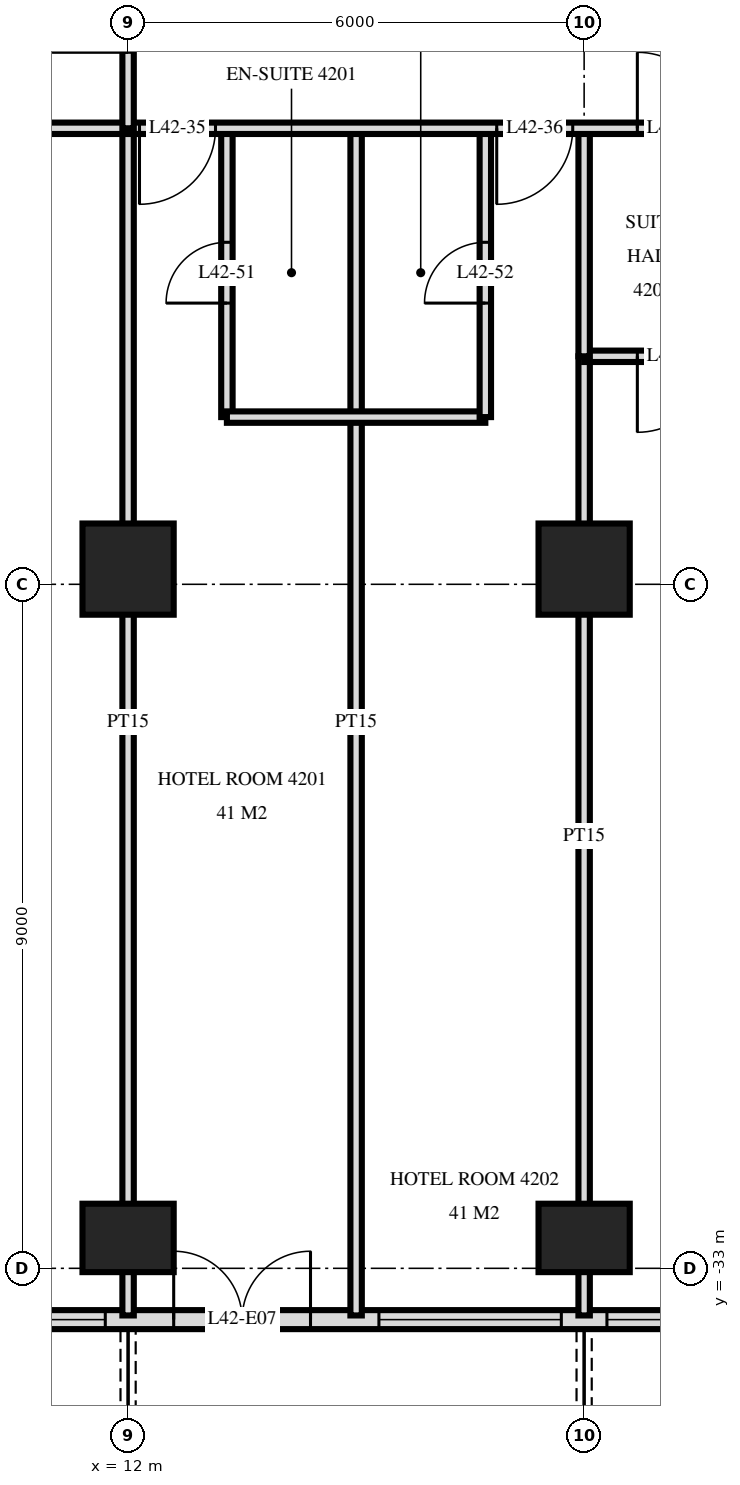
"""IFC4 building model, lengths in metres.
Left out: names, types, materials, properties, quantities, classifications, styles, units other than length and angle.
Written with IfcOpenShell. Run it as: python <this file> out.ifc"""

import sys

from ifc_helpers import new_model, si_unit, direction, frame, frame_2d, origin, origin_2d, place, context, subcontext, project, spatial, rectangle, extrude, element, fill, save


model = new_model("IFC4")
c1 = context("Model", 3, precision=1e-05, world=origin(), true_north=direction((0.0, 1.0)))
c2 = subcontext(c1, "Body", "Model", "MODEL_VIEW")
j1 = project(units=[si_unit("LENGTHUNIT", "METRE"), si_unit("PLANEANGLEUNIT", "RADIAN")], contexts=[c1])
p1 = place(None, origin())
s1 = spatial("IfcSite", under=j1, at=p1, CompositionType="ELEMENT")
p2 = place(p1, origin())
s2 = spatial("IfcBuilding", under=s1, at=p2, CompositionType="ELEMENT")
p3 = place(p2, frame((0.0, 0.0, 163.2)))
s3 = spatial("IfcBuildingStorey", under=s2, at=p3, CompositionType="ELEMENT", Elevation=163.2)
p4 = place(p3, frame((12.0, -32.6, 0.0), z_axis=(0.0, 0.0, 1.0), x_axis=(1.0, 0.0, 0.0)))
e1 = element("IfcColumn", 1, at=p4, inside=s3, PredefinedType="COLUMN", context=c2, shape_type="SweptSolid", body=[
    extrude(rectangle(XDim=1.2, YDim=0.9, at=origin_2d()), origin(), (0.0, 0.0, 1.0), 3.6),
])
p5 = place(p3, frame((12.0, -23.8, 0.0), z_axis=(0.0, 0.0, 1.0), x_axis=(1.0, 0.0, 0.0)))
e2 = element("IfcColumn", 2, at=p5, inside=s3, PredefinedType="COLUMN", context=c2, shape_type="SweptSolid", body=[
    extrude(rectangle(XDim=1.2, YDim=1.2, at=origin_2d()), origin(), (0.0, 0.0, 1.0), 3.6),
])
p6 = place(p3, frame((18.0, -32.6, 0.0), z_axis=(0.0, 0.0, 1.0), x_axis=(1.0, 0.0, 0.0)))
e3 = element("IfcColumn", 3, at=p6, inside=s3, PredefinedType="COLUMN", context=c2, shape_type="SweptSolid", body=[
    extrude(rectangle(XDim=1.2, YDim=0.9, at=origin_2d()), origin(), (0.0, 0.0, 1.0), 3.6),
])
p7 = place(p3, frame((18.0, -23.8, 0.0), z_axis=(0.0, 0.0, 1.0), x_axis=(1.0, 0.0, 0.0)))
e4 = element("IfcColumn", 4, at=p7, inside=s3, PredefinedType="COLUMN", context=c2, shape_type="SweptSolid", body=[
    extrude(rectangle(XDim=1.2, YDim=1.2, at=origin_2d()), origin(), (0.0, 0.0, 1.0), 3.6),
])
p8 = place(p3, frame((-23.675, -33.675, 0.0), z_axis=(0.0, 0.0, 1.0), x_axis=(1.0, 0.0, 0.0)))
e5 = element("IfcWall", 5, at=p8, inside=s3, PredefinedType="SOLIDWALL", context=c2, shape_type="SweptSolid", body=[
    extrude(rectangle(XDim=47.351, YDim=0.25, at=frame_2d((23.675, 0.0))), origin(), (0.0, 0.0, 1.0), 3.32),
])
p9 = place(p8, frame((0.575, 0.0, 0.0)))
e6 = element("IfcOpeningElement", 6, at=p9, cuts=e5, PredefinedType="OPENING", context=c2, shape_type="SweptSolid", body=[
    extrude(rectangle(XDim=1.8, YDim=2.4, at=frame_2d((0.9, 1.2))), frame((0.0, 0.135, 0.0), z_axis=(0.0, -1.0, 0.0), x_axis=(1.0, 0.0, 0.0)), (0.0, 0.0, 1.0), 0.27),
])
p10 = place(p8, frame((3.425, 0.0, 0.3)))
e7 = element("IfcOpeningElement", 7, at=p10, cuts=e5, PredefinedType="OPENING", context=c2, shape_type="SweptSolid", body=[
    extrude(rectangle(XDim=1.8, YDim=2.1, at=frame_2d((0.9, 1.05))), frame((0.0, 0.135, 0.0), z_axis=(0.0, -1.0, 0.0), x_axis=(1.0, 0.0, 0.0)), (0.0, 0.0, 1.0), 0.27),
])
p11 = place(p8, frame((5.975, 0.0, 0.3)))
e8 = element("IfcOpeningElement", 8, at=p11, cuts=e5, PredefinedType="OPENING", context=c2, shape_type="SweptSolid", body=[
    extrude(rectangle(XDim=2.4, YDim=2.1, at=frame_2d((1.2, 1.05))), frame((0.0, 0.135, 0.0), z_axis=(0.0, -1.0, 0.0), x_axis=(1.0, 0.0, 0.0)), (0.0, 0.0, 1.0), 0.27),
])
p12 = place(p8, frame((9.275, 0.0, 0.0)))
e9 = element("IfcOpeningElement", 9, at=p12, cuts=e5, PredefinedType="OPENING", context=c2, shape_type="SweptSolid", body=[
    extrude(rectangle(XDim=1.8, YDim=2.4, at=frame_2d((0.9, 1.2))), frame((0.0, 0.135, 0.0), z_axis=(0.0, -1.0, 0.0), x_axis=(1.0, 0.0, 0.0)), (0.0, 0.0, 1.0), 0.27),
])
p13 = place(p8, frame((12.275, 0.0, 0.0)))
e10 = element("IfcOpeningElement", 10, at=p13, cuts=e5, PredefinedType="OPENING", context=c2, shape_type="SweptSolid", body=[
    extrude(rectangle(XDim=1.8, YDim=2.4, at=frame_2d((0.9, 1.2))), frame((0.0, 0.135, 0.0), z_axis=(0.0, -1.0, 0.0), x_axis=(1.0, 0.0, 0.0)), (0.0, 0.0, 1.0), 0.27),
])
p14 = place(p8, frame((14.975, 0.0, 0.3)))
e11 = element("IfcOpeningElement", 11, at=p14, cuts=e5, PredefinedType="OPENING", context=c2, shape_type="SweptSolid", body=[
    extrude(rectangle(XDim=2.4, YDim=2.1, at=frame_2d((1.2, 1.05))), frame((0.0, 0.135, 0.0), z_axis=(0.0, -1.0, 0.0), x_axis=(1.0, 0.0, 0.0)), (0.0, 0.0, 1.0), 0.27),
])
p15 = place(p8, frame((17.975, 0.0, 0.3)))
e12 = element("IfcOpeningElement", 12, at=p15, cuts=e5, PredefinedType="OPENING", context=c2, shape_type="SweptSolid", body=[
    extrude(rectangle(XDim=2.4, YDim=2.1, at=frame_2d((1.2, 1.05))), frame((0.0, 0.135, 0.0), z_axis=(0.0, -1.0, 0.0), x_axis=(1.0, 0.0, 0.0)), (0.0, 0.0, 1.0), 0.27),
])
p16 = place(p8, frame((21.275, 0.0, 0.0)))
e13 = element("IfcOpeningElement", 13, at=p16, cuts=e5, PredefinedType="OPENING", context=c2, shape_type="SweptSolid", body=[
    extrude(rectangle(XDim=1.8, YDim=2.4, at=frame_2d((0.9, 1.2))), frame((0.0, 0.135, 0.0), z_axis=(0.0, -1.0, 0.0), x_axis=(1.0, 0.0, 0.0)), (0.0, 0.0, 1.0), 0.27),
])
p17 = place(p8, frame((24.275, 0.0, 0.0)))
e14 = element("IfcOpeningElement", 14, at=p17, cuts=e5, PredefinedType="OPENING", context=c2, shape_type="SweptSolid", body=[
    extrude(rectangle(XDim=1.8, YDim=2.4, at=frame_2d((0.9, 1.2))), frame((0.0, 0.135, 0.0), z_axis=(0.0, -1.0, 0.0), x_axis=(1.0, 0.0, 0.0)), (0.0, 0.0, 1.0), 0.27),
])
p18 = place(p8, frame((26.975, 0.0, 0.3)))
e15 = element("IfcOpeningElement", 15, at=p18, cuts=e5, PredefinedType="OPENING", context=c2, shape_type="SweptSolid", body=[
    extrude(rectangle(XDim=2.4, YDim=2.1, at=frame_2d((1.2, 1.05))), frame((0.0, 0.135, 0.0), z_axis=(0.0, -1.0, 0.0), x_axis=(1.0, 0.0, 0.0)), (0.0, 0.0, 1.0), 0.27),
])
p19 = place(p8, frame((30.275, 0.0, 0.0)))
e16 = element("IfcOpeningElement", 16, at=p19, cuts=e5, PredefinedType="OPENING", context=c2, shape_type="SweptSolid", body=[
    extrude(rectangle(XDim=1.8, YDim=2.4, at=frame_2d((0.9, 1.2))), frame((0.0, 0.135, 0.0), z_axis=(0.0, -1.0, 0.0), x_axis=(1.0, 0.0, 0.0)), (0.0, 0.0, 1.0), 0.27),
])
p20 = place(p8, frame((32.975, 0.0, 0.3)))
e17 = element("IfcOpeningElement", 17, at=p20, cuts=e5, PredefinedType="OPENING", context=c2, shape_type="SweptSolid", body=[
    extrude(rectangle(XDim=2.4, YDim=2.1, at=frame_2d((1.2, 1.05))), frame((0.0, 0.135, 0.0), z_axis=(0.0, -1.0, 0.0), x_axis=(1.0, 0.0, 0.0)), (0.0, 0.0, 1.0), 0.27),
])
p21 = place(p8, frame((36.275, 0.0, 0.0)))
e18 = element("IfcOpeningElement", 18, at=p21, cuts=e5, PredefinedType="OPENING", context=c2, shape_type="SweptSolid", body=[
    extrude(rectangle(XDim=1.8, YDim=2.4, at=frame_2d((0.9, 1.2))), frame((0.0, 0.135, 0.0), z_axis=(0.0, -1.0, 0.0), x_axis=(1.0, 0.0, 0.0)), (0.0, 0.0, 1.0), 0.27),
])
p22 = place(p8, frame((38.975, 0.0, 0.3)))
e19 = element("IfcOpeningElement", 19, at=p22, cuts=e5, PredefinedType="OPENING", context=c2, shape_type="SweptSolid", body=[
    extrude(rectangle(XDim=2.4, YDim=2.1, at=frame_2d((1.2, 1.05))), frame((0.0, 0.135, 0.0), z_axis=(0.0, -1.0, 0.0), x_axis=(1.0, 0.0, 0.0)), (0.0, 0.0, 1.0), 0.27),
])
p23 = place(p8, frame((41.975, 0.0, 0.3)))
e20 = element("IfcOpeningElement", 20, at=p23, cuts=e5, PredefinedType="OPENING", context=c2, shape_type="SweptSolid", body=[
    extrude(rectangle(XDim=2.4, YDim=2.1, at=frame_2d((1.2, 1.05))), frame((0.0, 0.135, 0.0), z_axis=(0.0, -1.0, 0.0), x_axis=(1.0, 0.0, 0.0)), (0.0, 0.0, 1.0), 0.27),
])
p24 = place(p8, frame((45.125, 0.0, 0.0)))
e21 = element("IfcOpeningElement", 21, at=p24, cuts=e5, PredefinedType="OPENING", context=c2, shape_type="SweptSolid", body=[
    extrude(rectangle(XDim=1.8, YDim=2.4, at=frame_2d((0.9, 1.2))), frame((0.0, 0.135, 0.0), z_axis=(0.0, -1.0, 0.0), x_axis=(1.0, 0.0, 0.0)), (0.0, 0.0, 1.0), 0.27),
])
p25 = place(p3, frame((18.0, -21.0, 0.0), z_axis=(0.0, 0.0, 1.0), x_axis=(0.0, 1.0, 0.0)))
e22 = element("IfcWall", 22, at=p25, inside=s3, PredefinedType="PARTITIONING", context=c2, shape_type="SweptSolid", body=[
    extrude(rectangle(XDim=3.0, YDim=0.15, at=frame_2d((1.5, 0.0))), origin(), (0.0, 0.0, 1.0), 3.32),
])
p26 = place(p3, frame((18.0, -33.62, 0.0), z_axis=(0.0, 0.0, 1.0), x_axis=(0.0, 1.0, 0.0)))
e23 = element("IfcWall", 23, at=p26, inside=s3, PredefinedType="PARTITIONING", context=c2, shape_type="SweptSolid", body=[
    extrude(rectangle(XDim=12.62, YDim=0.15, at=frame_2d((6.31, 0.0))), origin(), (0.0, 0.0, 1.0), 3.32),
])
p27 = place(p3, frame((16.7, -21.8, 0.0), z_axis=(0.0, 0.0, 1.0), x_axis=(0.0, 1.0, 0.0)))
e24 = element("IfcWall", 24, at=p27, inside=s3, PredefinedType="PARTITIONING", context=c2, shape_type="SweptSolid", body=[
    extrude(rectangle(XDim=3.8, YDim=0.15, at=frame_2d((1.9, 0.0))), origin(), (0.0, 0.0, 1.0), 3.32),
])
p28 = place(p27, frame((1.5, 0.0, 0.0)))
e25 = element("IfcOpeningElement", 25, at=p28, cuts=e24, PredefinedType="OPENING", context=c2, shape_type="SweptSolid", body=[
    extrude(rectangle(XDim=0.8, YDim=2.1, at=frame_2d((0.4, 1.05))), frame((0.0, 0.085, 0.0), z_axis=(0.0, -1.0, 0.0), x_axis=(1.0, 0.0, 0.0)), (0.0, 0.0, 1.0), 0.17),
])
p29 = place(p3, frame((15.0, -33.62, 0.0), z_axis=(0.0, 0.0, 1.0), x_axis=(0.0, 1.0, 0.0)))
e26 = element("IfcWall", 26, at=p29, inside=s3, PredefinedType="PARTITIONING", context=c2, shape_type="SweptSolid", body=[
    extrude(rectangle(XDim=15.62, YDim=0.15, at=frame_2d((7.81, 0.0))), origin(), (0.0, 0.0, 1.0), 3.32),
])
p30 = place(p3, frame((13.3, -21.8, 0.0), z_axis=(0.0, 0.0, 1.0), x_axis=(0.0, 1.0, 0.0)))
e27 = element("IfcWall", 27, at=p30, inside=s3, PredefinedType="PARTITIONING", context=c2, shape_type="SweptSolid", body=[
    extrude(rectangle(XDim=3.8, YDim=0.15, at=frame_2d((1.9, 0.0))), origin(), (0.0, 0.0, 1.0), 3.32),
])
p31 = place(p30, frame((1.5, 0.0, 0.0)))
e28 = element("IfcOpeningElement", 28, at=p31, cuts=e27, PredefinedType="OPENING", context=c2, shape_type="SweptSolid", body=[
    extrude(rectangle(XDim=0.8, YDim=2.1, at=frame_2d((0.4, 1.05))), frame((0.0, 0.085, 0.0), z_axis=(0.0, -1.0, 0.0), x_axis=(1.0, 0.0, 0.0)), (0.0, 0.0, 1.0), 0.17),
])
p32 = place(p3, frame((12.0, -18.0, 0.0), z_axis=(0.0, 0.0, 1.0), x_axis=(0.0, 1.0, 0.0)))
e29 = element("IfcWall", 29, at=p32, inside=s3, PredefinedType="PARTITIONING", context=c2, shape_type="SweptSolid", body=[
    extrude(rectangle(XDim=2.95, YDim=0.15, at=frame_2d((1.475, 0.0))), origin(), (0.0, 0.0, 1.0), 3.32),
])
p33 = place(p32, frame((1.0, 0.0, 0.0)))
e30 = element("IfcOpeningElement", 30, at=p33, cuts=e29, PredefinedType="OPENING", context=c2, shape_type="SweptSolid", body=[
    extrude(rectangle(XDim=1.0, YDim=2.1, at=frame_2d((0.5, 1.05))), frame((0.0, 0.085, 0.0), z_axis=(0.0, -1.0, 0.0), x_axis=(1.0, 0.0, 0.0)), (0.0, 0.0, 1.0), 0.17),
])
p34 = place(p3, frame((12.0, -33.62, 0.0), z_axis=(0.0, 0.0, 1.0), x_axis=(0.0, 1.0, 0.0)))
e31 = element("IfcWall", 31, at=p34, inside=s3, PredefinedType="PARTITIONING", context=c2, shape_type="SweptSolid", body=[
    extrude(rectangle(XDim=15.62, YDim=0.15, at=frame_2d((7.81, 0.0))), origin(), (0.0, 0.0, 1.0), 3.32),
])
p35 = place(p3, frame((13.3, -21.8, 0.0), z_axis=(0.0, 0.0, 1.0), x_axis=(1.0, 0.0, 0.0)))
e32 = element("IfcWall", 32, at=p35, inside=s3, PredefinedType="PARTITIONING", context=c2, shape_type="SweptSolid", body=[
    extrude(rectangle(XDim=3.4, YDim=0.15, at=frame_2d((1.7, 0.0))), origin(), (0.0, 0.0, 1.0), 3.32),
])
p36 = place(p3, frame((18.0, -21.0, 0.0), z_axis=(0.0, 0.0, 1.0), x_axis=(1.0, 0.0, 0.0)))
e33 = element("IfcWall", 33, at=p36, inside=s3, PredefinedType="PARTITIONING", context=c2, shape_type="SweptSolid", body=[
    extrude(rectangle(XDim=2.4, YDim=0.15, at=frame_2d((1.2, 0.0))), origin(), (0.0, 0.0, 1.0), 3.32),
])
p37 = place(p36, frame((0.7, 0.0, 0.0)))
e34 = element("IfcOpeningElement", 34, at=p37, cuts=e33, PredefinedType="OPENING", context=c2, shape_type="SweptSolid", body=[
    extrude(rectangle(XDim=1.0, YDim=2.1, at=frame_2d((0.5, 1.05))), frame((0.0, 0.085, 0.0), z_axis=(0.0, -1.0, 0.0), x_axis=(1.0, 0.0, 0.0)), (0.0, 0.0, 1.0), 0.17),
])
p38 = place(p3, frame((-28.02, -18.0, 0.0), z_axis=(0.0, 0.0, 1.0), x_axis=(1.0, 0.0, 0.0)))
e35 = element("IfcWall", 35, at=p38, inside=s3, PredefinedType="PARTITIONING", context=c2, shape_type="SweptSolid", body=[
    extrude(rectangle(XDim=56.04, YDim=0.15, at=frame_2d((28.02, 0.0))), origin(), (0.0, 0.0, 1.0), 3.32),
])
p39 = place(p38, frame((14.32, 0.0, 0.0)))
e36 = element("IfcOpeningElement", 36, at=p39, cuts=e35, PredefinedType="OPENING", context=c2, shape_type="SweptSolid", body=[
    extrude(rectangle(XDim=1.0, YDim=2.1, at=frame_2d((0.5, 1.05))), frame((0.0, 0.085, 0.0), z_axis=(0.0, -1.0, 0.0), x_axis=(1.0, 0.0, 0.0)), (0.0, 0.0, 1.0), 0.17),
])
p40 = place(p38, frame((40.17, 0.0, 0.0)))
e37 = element("IfcOpeningElement", 37, at=p40, cuts=e35, PredefinedType="OPENING", context=c2, shape_type="SweptSolid", body=[
    extrude(rectangle(XDim=1.0, YDim=2.1, at=frame_2d((0.5, 1.05))), frame((0.0, 0.085, 0.0), z_axis=(0.0, -1.0, 0.0), x_axis=(1.0, 0.0, 0.0)), (0.0, 0.0, 1.0), 0.17),
])
p41 = place(p38, frame((44.87, 0.0, 0.0)))
e38 = element("IfcOpeningElement", 38, at=p41, cuts=e35, PredefinedType="OPENING", context=c2, shape_type="SweptSolid", body=[
    extrude(rectangle(XDim=1.0, YDim=2.1, at=frame_2d((0.5, 1.05))), frame((0.0, 0.085, 0.0), z_axis=(0.0, -1.0, 0.0), x_axis=(1.0, 0.0, 0.0)), (0.0, 0.0, 1.0), 0.17),
])
p42 = place(p38, frame((46.72, 0.0, 0.0)))
e39 = element("IfcOpeningElement", 39, at=p42, cuts=e35, PredefinedType="OPENING", context=c2, shape_type="SweptSolid", body=[
    extrude(rectangle(XDim=1.0, YDim=2.1, at=frame_2d((0.5, 1.05))), frame((0.0, 0.085, 0.0), z_axis=(0.0, -1.0, 0.0), x_axis=(1.0, 0.0, 0.0)), (0.0, 0.0, 1.0), 0.17),
])
p43 = place(p38, frame((18.52, 0.0, 0.0)))
e40 = element("IfcOpeningElement", 40, at=p43, cuts=e35, PredefinedType="OPENING", context=c2, shape_type="SweptSolid", body=[
    extrude(rectangle(XDim=1.0, YDim=2.1, at=frame_2d((0.5, 1.05))), frame((0.0, 0.085, 0.0), z_axis=(0.0, -1.0, 0.0), x_axis=(1.0, 0.0, 0.0)), (0.0, 0.0, 1.0), 0.17),
])
p44 = place(p38, frame((24.52, 0.0, 0.0)))
e41 = element("IfcOpeningElement", 41, at=p44, cuts=e35, PredefinedType="OPENING", context=c2, shape_type="SweptSolid", body=[
    extrude(rectangle(XDim=1.0, YDim=2.1, at=frame_2d((0.5, 1.05))), frame((0.0, 0.085, 0.0), z_axis=(0.0, -1.0, 0.0), x_axis=(1.0, 0.0, 0.0)), (0.0, 0.0, 1.0), 0.17),
])
p45 = place(p38, frame((30.52, 0.0, 0.0)))
e42 = element("IfcOpeningElement", 42, at=p45, cuts=e35, PredefinedType="OPENING", context=c2, shape_type="SweptSolid", body=[
    extrude(rectangle(XDim=1.0, YDim=2.1, at=frame_2d((0.5, 1.05))), frame((0.0, 0.085, 0.0), z_axis=(0.0, -1.0, 0.0), x_axis=(1.0, 0.0, 0.0)), (0.0, 0.0, 1.0), 0.17),
])
p46 = place(p38, frame((36.52, 0.0, 0.0)))
e43 = element("IfcOpeningElement", 43, at=p46, cuts=e35, PredefinedType="OPENING", context=c2, shape_type="SweptSolid", body=[
    extrude(rectangle(XDim=1.0, YDim=2.1, at=frame_2d((0.5, 1.05))), frame((0.0, 0.085, 0.0), z_axis=(0.0, -1.0, 0.0), x_axis=(1.0, 0.0, 0.0)), (0.0, 0.0, 1.0), 0.17),
])
p47 = place(p20, origin())
e44 = element("IfcWindow", 44, at=p47, inside=s3, PartitioningType="SINGLE_PANEL", PredefinedType="WINDOW", context=c2, shape_type="SweptSolid", body=[
    extrude(rectangle(XDim=2.4, YDim=2.1, at=frame_2d((1.2, 1.05))), frame((0.0, 0.03, 0.0), z_axis=(0.0, -1.0, 0.0), x_axis=(1.0, 0.0, 0.0)), (0.0, 0.0, 1.0), 0.06),
])
fill(e17, e44)
p48 = place(p21, origin())
e45 = element("IfcDoor", 45, at=p48, inside=s3, OperationType="DOUBLE_DOOR_SINGLE_SWING", PredefinedType="DOOR", context=c2, shape_type="SweptSolid", body=[
    extrude(rectangle(XDim=1.8, YDim=2.4, at=frame_2d((0.9, 1.2))), frame((0.0, 0.025, 0.0), z_axis=(0.0, -1.0, 0.0), x_axis=(1.0, 0.0, 0.0)), (0.0, 0.0, 1.0), 0.05),
])
fill(e18, e45)
p49 = place(p22, origin())
e46 = element("IfcWindow", 46, at=p49, inside=s3, PartitioningType="SINGLE_PANEL", PredefinedType="WINDOW", context=c2, shape_type="SweptSolid", body=[
    extrude(rectangle(XDim=2.4, YDim=2.1, at=frame_2d((1.2, 1.05))), frame((0.0, 0.03, 0.0), z_axis=(0.0, -1.0, 0.0), x_axis=(1.0, 0.0, 0.0)), (0.0, 0.0, 1.0), 0.06),
])
fill(e19, e46)
p50 = place(p23, origin())
e47 = element("IfcWindow", 47, at=p50, inside=s3, PartitioningType="SINGLE_PANEL", PredefinedType="WINDOW", context=c2, shape_type="SweptSolid", body=[
    extrude(rectangle(XDim=2.4, YDim=2.1, at=frame_2d((1.2, 1.05))), frame((0.0, 0.03, 0.0), z_axis=(0.0, -1.0, 0.0), x_axis=(1.0, 0.0, 0.0)), (0.0, 0.0, 1.0), 0.06),
])
fill(e20, e47)
p51 = place(p40, frame((0.5, 0.0, 0.0), z_axis=(0.0, 0.0, 1.0), x_axis=(-1.0, 0.0, 0.0)))
e48 = element("IfcDoor", 48, at=p51, inside=s3, OperationType="SINGLE_SWING_LEFT", PredefinedType="DOOR", context=c2, shape_type="SweptSolid", body=[
    extrude(rectangle(XDim=1.0, YDim=2.1, at=frame_2d((0.0, 1.05))), frame((0.0, -0.025, 0.0), z_axis=(0.0, 1.0, 0.0), x_axis=(-1.0, 0.0, 0.0)), (0.0, 0.0, 1.0), 0.05),
])
fill(e37, e48)
p52 = place(p41, frame((0.5, 0.0, 0.0), z_axis=(0.0, 0.0, 1.0), x_axis=(-1.0, 0.0, 0.0)))
e49 = element("IfcDoor", 49, at=p52, inside=s3, OperationType="SINGLE_SWING_LEFT", PredefinedType="DOOR", context=c2, shape_type="SweptSolid", body=[
    extrude(rectangle(XDim=1.0, YDim=2.1, at=frame_2d((0.0, 1.05))), frame((0.0, -0.025, 0.0), z_axis=(0.0, 1.0, 0.0), x_axis=(-1.0, 0.0, 0.0)), (0.0, 0.0, 1.0), 0.05),
])
fill(e38, e49)
p53 = place(p42, origin())
e50 = element("IfcDoor", 50, at=p53, inside=s3, OperationType="SINGLE_SWING_RIGHT", PredefinedType="DOOR", context=c2, shape_type="SweptSolid", body=[
    extrude(rectangle(XDim=1.0, YDim=2.1, at=frame_2d((0.5, 1.05))), frame((0.0, 0.025, 0.0), z_axis=(0.0, -1.0, 0.0), x_axis=(1.0, 0.0, 0.0)), (0.0, 0.0, 1.0), 0.05),
])
fill(e39, e50)
p54 = place(p31, origin())
e51 = element("IfcDoor", 51, at=p54, inside=s3, OperationType="SINGLE_SWING_RIGHT", PredefinedType="DOOR", context=c2, shape_type="SweptSolid", body=[
    extrude(rectangle(XDim=0.8, YDim=2.1, at=frame_2d((0.4, 1.05))), frame((0.0, 0.025, 0.0), z_axis=(0.0, -1.0, 0.0), x_axis=(1.0, 0.0, 0.0)), (0.0, 0.0, 1.0), 0.05),
])
fill(e28, e51)
p55 = place(p28, origin())
e52 = element("IfcDoor", 52, at=p55, inside=s3, OperationType="SINGLE_SWING_RIGHT", PredefinedType="DOOR", context=c2, shape_type="SweptSolid", body=[
    extrude(rectangle(XDim=0.8, YDim=2.1, at=frame_2d((0.4, 1.05))), frame((0.0, 0.025, 0.0), z_axis=(0.0, -1.0, 0.0), x_axis=(1.0, 0.0, 0.0)), (0.0, 0.0, 1.0), 0.05),
])
fill(e25, e52)
p56 = place(p37, frame((0.5, 0.0, 0.0), z_axis=(0.0, 0.0, 1.0), x_axis=(-1.0, 0.0, 0.0)))
e53 = element("IfcDoor", 53, at=p56, inside=s3, OperationType="SINGLE_SWING_LEFT", PredefinedType="DOOR", context=c2, shape_type="SweptSolid", body=[
    extrude(rectangle(XDim=1.0, YDim=2.1, at=frame_2d((0.0, 1.05))), frame((0.0, -0.025, 0.0), z_axis=(0.0, 1.0, 0.0), x_axis=(-1.0, 0.0, 0.0)), (0.0, 0.0, 1.0), 0.05),
])
fill(e34, e53)
save(model, sys.argv[1])
